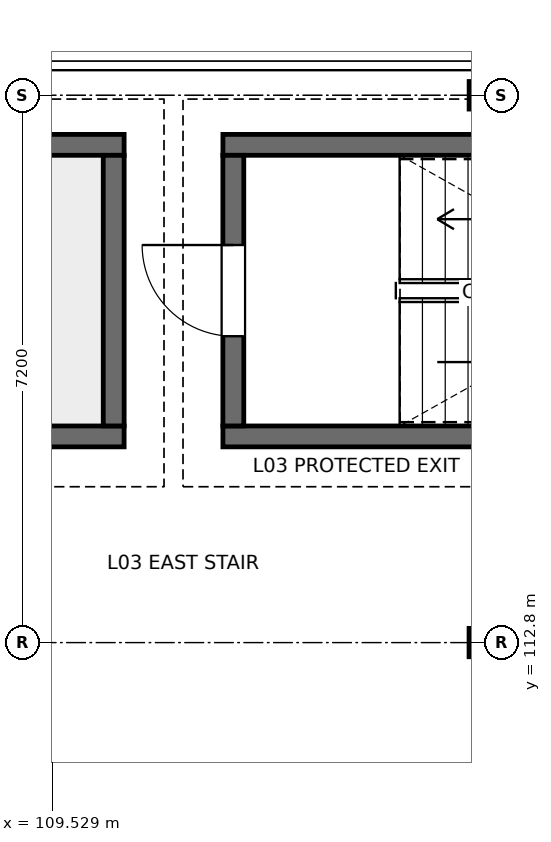
"""IFC4 building model, lengths in metres.
Left out: names, types, materials, properties, quantities, classifications, styles, units other than length and angle.
Written with IfcOpenShell. Run it as: python <this file> out.ifc"""

import sys

from ifc_helpers import new_model, si_unit, direction, frame, frame_2d, origin, origin_2d, place, context, subcontext, project, spatial, rectangle, i_section, extrude, element, fill, save


model = new_model("IFC4")
c1 = context("Model", 3, precision=1e-05, world=origin(), true_north=direction((0.0, 1.0)))
c2 = subcontext(c1, "Body", "Model", "MODEL_VIEW")
j1 = project(units=[si_unit("LENGTHUNIT", "METRE"), si_unit("PLANEANGLEUNIT", "RADIAN")], contexts=[c1])
p1 = place(None, origin())
s1 = spatial("IfcSite", under=j1, at=p1, CompositionType="ELEMENT")
p2 = place(p1, origin())
s2 = spatial("IfcBuilding", under=s1, at=p2, CompositionType="ELEMENT")
p3 = place(p2, frame((0.0, 0.0, 13.2)))
s3 = spatial("IfcBuildingStorey", under=s2, at=p3, CompositionType="ELEMENT", Elevation=13.2)
p4 = place(p3, frame((115.2, 112.8, 0.0), z_axis=(0.0, 0.0, 1.0), x_axis=(1.0, 0.0, 0.0)))
e1 = element("IfcColumn", 1, at=p4, inside=s3, PredefinedType="COLUMN", context=c2, shape_type="SweptSolid", body=[
    extrude(i_section(OverallWidth=0.373, OverallDepth=0.373, WebThickness=0.016, FlangeThickness=0.026, FilletRadius=0.015, at=origin_2d()), origin(), (0.0, 0.0, 1.0), 3.9),
])
p5 = place(p3, frame((115.2, 120.0, 0.0), z_axis=(0.0, 0.0, 1.0), x_axis=(1.0, 0.0, 0.0)))
e2 = element("IfcColumn", 2, at=p5, inside=s3, PredefinedType="COLUMN", context=c2, shape_type="SweptSolid", body=[
    extrude(i_section(OverallWidth=0.371, OverallDepth=0.363, WebThickness=0.013, FlangeThickness=0.022, FilletRadius=0.015, at=origin_2d()), origin(), (0.0, 0.0, 1.0), 3.9),
])
for number, where, z_axis, x_axis in (
    (3, (110.475, 115.512, 0.0), (0.0, 0.0, 1.0), (-1.0, 0.0, 0.0)),
    (4, (101.575, 119.348, 0.0), (0.0, 0.0, 1.0), (1.0, 0.0, 0.0)),
):
    element("IfcWall", number, at=place(p3, frame(where, z_axis=z_axis, x_axis=x_axis)), inside=s3, PredefinedType="SOLIDWALL", context=c2, shape_type="SweptSolid", body=[
        extrude(rectangle(XDim=8.9, YDim=0.275, at=frame_2d((4.45, 0.0))), origin(), (0.0, 0.0, 1.0), 3.66),
    ])
p6 = place(p3, frame((110.338, 119.21, 0.0), z_axis=(0.0, 0.0, 1.0), x_axis=(0.0, -1.0, 0.0)))
e5 = element("IfcWall", 5, at=p6, inside=s3, PredefinedType="SOLIDWALL", context=c2, shape_type="SweptSolid", body=[
    extrude(rectangle(XDim=3.56, YDim=0.275, at=frame_2d((1.78, 0.0))), origin(), (0.0, 0.0, 1.0), 3.66),
])
for number, where, z_axis, x_axis in (
    (6, (120.725, 115.512, 0.0), (0.0, 0.0, 1.0), (-1.0, 0.0, 0.0)),
    (7, (111.775, 119.348, 0.0), (0.0, 0.0, 1.0), (1.0, 0.0, 0.0)),
):
    element("IfcWall", number, at=place(p3, frame(where, z_axis=z_axis, x_axis=x_axis)), inside=s3, PredefinedType="SOLIDWALL", context=c2, shape_type="SweptSolid", body=[
        extrude(rectangle(XDim=8.95, YDim=0.275, at=frame_2d((4.475, 0.0))), origin(), (0.0, 0.0, 1.0), 3.66),
    ])
p7 = place(p3, frame((111.912, 115.65, 0.0), z_axis=(0.0, 0.0, 1.0), x_axis=(0.0, 1.0, 0.0)))
e8 = element("IfcWall", 8, at=p7, inside=s3, PredefinedType="SOLIDWALL", context=c2, shape_type="SweptSolid", body=[
    extrude(rectangle(XDim=3.56, YDim=0.275, at=frame_2d((1.78, 0.0))), origin(), (0.0, 0.0, 1.0), 3.66),
])
p8 = place(p7, frame((1.18, 0.0, 0.0)))
e9 = element("IfcOpeningElement", 9, at=p8, cuts=e8, PredefinedType="OPENING", context=c2, shape_type="SweptSolid", body=[
    extrude(rectangle(XDim=1.2, YDim=2.2, at=frame_2d((0.6, 1.1))), frame((0.0, 0.147, 0.0), z_axis=(0.0, -1.0, 0.0), x_axis=(1.0, 0.0, 0.0)), (0.0, 0.0, 1.0), 0.295),
])
p9 = place(p8, origin())
e10 = element("IfcDoor", 10, at=p9, inside=s3, OperationType="SINGLE_SWING_RIGHT", PredefinedType="DOOR", context=c2, shape_type="SweptSolid", body=[
    extrude(rectangle(XDim=1.2, YDim=2.2, at=frame_2d((0.6, 1.1))), frame((0.0, 0.025, 0.0), z_axis=(0.0, -1.0, 0.0), x_axis=(1.0, 0.0, 0.0)), (0.0, 0.0, 1.0), 0.05),
])
fill(e9, e10)
save(model, sys.argv[1])
